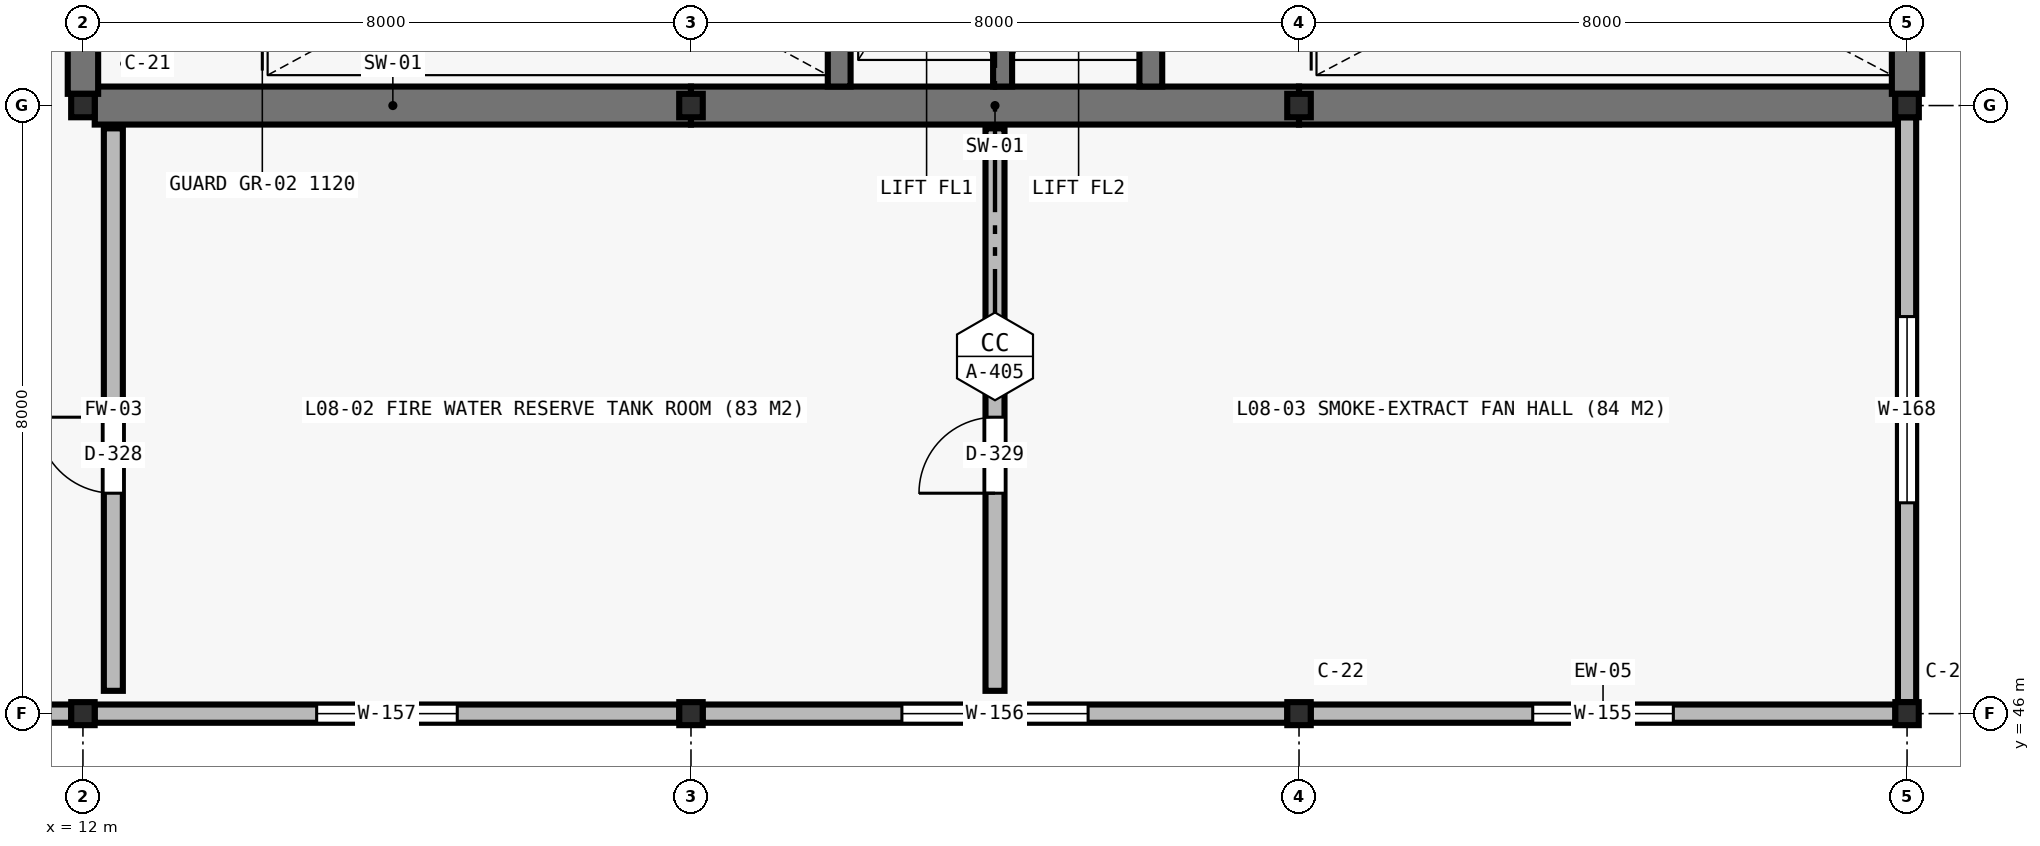
"""IFC4 building model, lengths in metres.
Left out: names, types, materials, properties, quantities, classifications, styles, units other than length and angle.
Written with IfcOpenShell. Run it as: python <this file> out.ifc"""

import sys

from ifc_helpers import new_model, si_unit, direction, frame, frame_2d, origin, origin_2d, place, context, subcontext, project, spatial, rectangle, i_section, extrude, element, fill, save


model = new_model("IFC4")
c1 = context("Model", 3, precision=1e-05, world=origin(), true_north=direction((0.0, 1.0)))
c2 = subcontext(c1, "Body", "Model", "MODEL_VIEW")
j1 = project(units=[si_unit("LENGTHUNIT", "METRE"), si_unit("PLANEANGLEUNIT", "RADIAN")], contexts=[c1])
p1 = place(None, origin())
s1 = spatial("IfcSite", under=j1, at=p1, CompositionType="ELEMENT")
p2 = place(p1, origin())
s2 = spatial("IfcBuilding", under=s1, at=p2, CompositionType="ELEMENT")
p3 = place(p2, frame((0.0, 0.0, 36.4)))
s3 = spatial("IfcBuildingStorey", under=s2, at=p3, CompositionType="ELEMENT", Elevation=36.4)
p4 = place(p3, frame((12.0, 46.0, 0.0), z_axis=(0.0, 0.0, 1.0), x_axis=(1.0, 0.0, 0.0)))
e1 = element("IfcColumn", 1, at=p4, inside=s3, PredefinedType="COLUMN", context=c2, shape_type="SweptSolid", body=[
    extrude(i_section(OverallWidth=0.308, OverallDepth=0.303, WebThickness=0.013, FlangeThickness=0.013, at=origin_2d()), origin(), (0.0, 0.0, 1.0), 3.98),
])
p5 = place(p3, frame((12.0, 54.0, 0.0), z_axis=(0.0, 0.0, 1.0), x_axis=(1.0, 0.0, 0.0)))
e2 = element("IfcColumn", 2, at=p5, inside=s3, PredefinedType="COLUMN", context=c2, shape_type="SweptSolid", body=[
    extrude(i_section(OverallWidth=0.31, OverallDepth=0.308, WebThickness=0.015, FlangeThickness=0.015, at=origin_2d()), origin(), (0.0, 0.0, 1.0), 3.98),
])
p6 = place(p3, frame((20.0, 46.0, 0.0), z_axis=(0.0, 0.0, 1.0), x_axis=(1.0, 0.0, 0.0)))
e3 = element("IfcColumn", 3, at=p6, inside=s3, PredefinedType="COLUMN", context=c2, shape_type="SweptSolid", body=[
    extrude(i_section(OverallWidth=0.308, OverallDepth=0.303, WebThickness=0.013, FlangeThickness=0.013, at=origin_2d()), origin(), (0.0, 0.0, 1.0), 3.98),
])
p7 = place(p3, frame((20.0, 54.0, 0.0), z_axis=(0.0, 0.0, 1.0), x_axis=(1.0, 0.0, 0.0)))
e4 = element("IfcColumn", 4, at=p7, inside=s3, PredefinedType="COLUMN", context=c2, shape_type="SweptSolid", body=[
    extrude(i_section(OverallWidth=0.31, OverallDepth=0.308, WebThickness=0.015, FlangeThickness=0.015, at=origin_2d()), origin(), (0.0, 0.0, 1.0), 3.98),
])
p8 = place(p3, frame((28.0, 46.0, 0.0), z_axis=(0.0, 0.0, 1.0), x_axis=(1.0, 0.0, 0.0)))
e5 = element("IfcColumn", 5, at=p8, inside=s3, PredefinedType="COLUMN", context=c2, shape_type="SweptSolid", body=[
    extrude(i_section(OverallWidth=0.308, OverallDepth=0.303, WebThickness=0.013, FlangeThickness=0.013, at=origin_2d()), origin(), (0.0, 0.0, 1.0), 3.98),
])
p9 = place(p3, frame((28.0, 54.0, 0.0), z_axis=(0.0, 0.0, 1.0), x_axis=(1.0, 0.0, 0.0)))
e6 = element("IfcColumn", 6, at=p9, inside=s3, PredefinedType="COLUMN", context=c2, shape_type="SweptSolid", body=[
    extrude(i_section(OverallWidth=0.31, OverallDepth=0.308, WebThickness=0.015, FlangeThickness=0.015, at=origin_2d()), origin(), (0.0, 0.0, 1.0), 3.98),
])
p10 = place(p3, frame((36.0, 46.0, 0.0), z_axis=(0.0, 0.0, 1.0), x_axis=(1.0, 0.0, 0.0)))
e7 = element("IfcColumn", 7, at=p10, inside=s3, PredefinedType="COLUMN", context=c2, shape_type="SweptSolid", body=[
    extrude(i_section(OverallWidth=0.308, OverallDepth=0.303, WebThickness=0.013, FlangeThickness=0.013, at=origin_2d()), origin(), (0.0, 0.0, 1.0), 3.98),
])
p11 = place(p3, frame((36.0, 54.0, 0.0), z_axis=(0.0, 0.0, 1.0), x_axis=(1.0, 0.0, 0.0)))
e8 = element("IfcColumn", 8, at=p11, inside=s3, PredefinedType="COLUMN", context=c2, shape_type="SweptSolid", body=[
    extrude(i_section(OverallWidth=0.31, OverallDepth=0.308, WebThickness=0.015, FlangeThickness=0.015, at=origin_2d()), origin(), (0.0, 0.0, 1.0), 3.98),
])
p12 = place(p3, frame((12.155, 54.0, 0.0), z_axis=(0.0, 0.0, 1.0), x_axis=(1.0, 0.0, 0.0)))
e9 = element("IfcWall", 9, at=p12, inside=s3, PredefinedType="SHEAR", context=c2, shape_type="SweptSolid", body=[
    extrude(rectangle(XDim=7.845, YDim=0.5, at=frame_2d((3.922, 0.0))), origin(), (0.0, 0.0, 1.0), 3.98),
])
p13 = place(p3, frame((20.0, 54.0, 0.0), z_axis=(0.0, 0.0, 1.0), x_axis=(1.0, 0.0, 0.0)))
e10 = element("IfcWall", 10, at=p13, inside=s3, PredefinedType="SHEAR", context=c2, shape_type="SweptSolid", body=[
    extrude(rectangle(XDim=8.0, YDim=0.5, at=frame_2d((4.0, 0.0))), origin(), (0.0, 0.0, 1.0), 3.98),
])
p14 = place(p3, frame((28.0, 54.0, 0.0), z_axis=(0.0, 0.0, 1.0), x_axis=(1.0, 0.0, 0.0)))
e11 = element("IfcWall", 11, at=p14, inside=s3, PredefinedType="SHEAR", context=c2, shape_type="SweptSolid", body=[
    extrude(rectangle(XDim=7.845, YDim=0.5, at=frame_2d((3.922, 0.0))), origin(), (0.0, 0.0, 1.0), 3.98),
])
for number, where, z_axis, x_axis in (
    (12, (12.0, 54.154, 0.0), (0.0, 0.0, 1.0), (0.0, 1.0, 0.0)),
    (13, (36.0, 54.154, 0.0), (0.0, 0.0, 1.0), (0.0, 1.0, 0.0)),
):
    element("IfcWall", number, at=place(p3, frame(where, z_axis=z_axis, x_axis=x_axis)), inside=s3, PredefinedType="SHEAR", context=c2, shape_type="SweptSolid", body=[
        extrude(rectangle(XDim=7.692, YDim=0.4, at=frame_2d((3.846, 0.0))), origin(), (0.0, 0.0, 1.0), 3.98),
    ])
for number, where, z_axis, x_axis in (
    (14, (21.95, 54.25, 0.0), (0.0, 0.0, 1.0), (0.0, 1.0, 0.0)),
    (15, (26.05, 54.25, 0.0), (0.0, 0.0, 1.0), (0.0, 1.0, 0.0)),
):
    element("IfcWall", number, at=place(p3, frame(where, z_axis=z_axis, x_axis=x_axis)), inside=s3, PredefinedType="SHEAR", context=c2, shape_type="SweptSolid", body=[
        extrude(rectangle(XDim=4.25, YDim=0.3, at=frame_2d((2.125, 0.0))), origin(), (0.0, 0.0, 1.0), 3.98),
    ])
p15 = place(p3, frame((24.1, 54.25, 0.0), z_axis=(0.0, 0.0, 1.0), x_axis=(0.0, 1.0, 0.0)))
e16 = element("IfcWall", 16, at=p15, inside=s3, PredefinedType="SHEAR", context=c2, shape_type="SweptSolid", body=[
    extrude(rectangle(XDim=3.2, YDim=0.25, at=frame_2d((1.6, 0.0))), origin(), (0.0, 0.0, 1.0), 3.98),
])
p16 = place(p3, frame((35.846, 46.0, 0.0), z_axis=(0.0, 0.0, 1.0), x_axis=(-1.0, 0.0, 0.0)))
e17 = element("IfcWall", 17, at=p16, inside=s3, PredefinedType="STANDARD", context=c2, shape_type="SweptSolid", body=[
    extrude(rectangle(XDim=7.692, YDim=0.24, at=frame_2d((3.846, 0.0))), origin(), (0.0, 0.0, 1.0), 3.573),
])
p17 = place(p16, frame((2.921, 0.0, 0.95)))
e18 = element("IfcOpeningElement", 18, at=p17, cuts=e17, PredefinedType="OPENING", context=c2, shape_type="SweptSolid", body=[
    extrude(rectangle(XDim=1.85, YDim=1.25, at=frame_2d((0.925, 0.625))), frame((0.0, 0.13, 0.0), z_axis=(0.0, -1.0, 0.0), x_axis=(1.0, 0.0, 0.0)), (0.0, 0.0, 1.0), 0.26),
])
p18 = place(p3, frame((27.846, 46.0, 0.0), z_axis=(0.0, 0.0, 1.0), x_axis=(-1.0, 0.0, 0.0)))
e19 = element("IfcWall", 19, at=p18, inside=s3, PredefinedType="STANDARD", context=c2, shape_type="SweptSolid", body=[
    extrude(rectangle(XDim=7.692, YDim=0.24, at=frame_2d((3.846, 0.0))), origin(), (0.0, 0.0, 1.0), 3.573),
])
p19 = place(p18, frame((2.621, 0.0, 0.95)))
e20 = element("IfcOpeningElement", 20, at=p19, cuts=e19, PredefinedType="OPENING", context=c2, shape_type="SweptSolid", body=[
    extrude(rectangle(XDim=2.45, YDim=1.35, at=frame_2d((1.225, 0.675))), frame((0.0, 0.13, 0.0), z_axis=(0.0, -1.0, 0.0), x_axis=(1.0, 0.0, 0.0)), (0.0, 0.0, 1.0), 0.26),
])
p20 = place(p3, frame((19.846, 46.0, 0.0), z_axis=(0.0, 0.0, 1.0), x_axis=(-1.0, 0.0, 0.0)))
e21 = element("IfcWall", 21, at=p20, inside=s3, PredefinedType="STANDARD", context=c2, shape_type="SweptSolid", body=[
    extrude(rectangle(XDim=7.692, YDim=0.24, at=frame_2d((3.846, 0.0))), origin(), (0.0, 0.0, 1.0), 3.573),
])
p21 = place(p20, frame((2.921, 0.0, 0.95)))
e22 = element("IfcOpeningElement", 22, at=p21, cuts=e21, PredefinedType="OPENING", context=c2, shape_type="SweptSolid", body=[
    extrude(rectangle(XDim=1.85, YDim=1.25, at=frame_2d((0.925, 0.625))), frame((0.0, 0.13, 0.0), z_axis=(0.0, -1.0, 0.0), x_axis=(1.0, 0.0, 0.0)), (0.0, 0.0, 1.0), 0.26),
])
p22 = place(p3, frame((11.846, 46.0, 0.0), z_axis=(0.0, 0.0, 1.0), x_axis=(-1.0, 0.0, 0.0)))
e23 = element("IfcWall", 23, at=p22, inside=s3, PredefinedType="STANDARD", context=c2, shape_type="SweptSolid", body=[
    extrude(rectangle(XDim=7.692, YDim=0.24, at=frame_2d((3.846, 0.0))), origin(), (0.0, 0.0, 1.0), 3.573),
])
p23 = place(p22, frame((2.621, 0.0, 0.95)))
e24 = element("IfcOpeningElement", 24, at=p23, cuts=e23, PredefinedType="OPENING", context=c2, shape_type="SweptSolid", body=[
    extrude(rectangle(XDim=2.45, YDim=1.35, at=frame_2d((1.225, 0.675))), frame((0.0, 0.13, 0.0), z_axis=(0.0, -1.0, 0.0), x_axis=(1.0, 0.0, 0.0)), (0.0, 0.0, 1.0), 0.26),
])
p24 = place(p3, frame((36.0, 53.846, 0.0), z_axis=(0.0, 0.0, 1.0), x_axis=(0.0, -1.0, 0.0)))
e25 = element("IfcWall", 25, at=p24, inside=s3, PredefinedType="STANDARD", context=c2, shape_type="SweptSolid", body=[
    extrude(rectangle(XDim=7.694, YDim=0.24, at=frame_2d((3.847, 0.0))), origin(), (0.0, 0.0, 1.0), 3.573),
])
p25 = place(p24, frame((2.622, 0.0, 0.95)))
e26 = element("IfcOpeningElement", 26, at=p25, cuts=e25, PredefinedType="OPENING", context=c2, shape_type="SweptSolid", body=[
    extrude(rectangle(XDim=2.45, YDim=1.35, at=frame_2d((1.225, 0.675))), frame((0.0, 0.13, 0.0), z_axis=(0.0, -1.0, 0.0), x_axis=(1.0, 0.0, 0.0)), (0.0, 0.0, 1.0), 0.26),
])
p26 = place(p3, frame((12.4, 46.3, 0.0), z_axis=(0.0, 0.0, 1.0), x_axis=(0.0, 1.0, 0.0)))
e27 = element("IfcWall", 27, at=p26, inside=s3, PredefinedType="SOLIDWALL", context=c2, shape_type="SweptSolid", body=[
    extrude(rectangle(XDim=7.4, YDim=0.25, at=frame_2d((3.7, 0.0))), origin(), (0.0, 0.0, 1.0), 3.98),
])
p27 = place(p26, frame((2.6, 0.0, 0.0)))
e28 = element("IfcOpeningElement", 28, at=p27, cuts=e27, PredefinedType="OPENING", context=c2, shape_type="SweptSolid", body=[
    extrude(rectangle(XDim=1.0, YDim=2.15, at=frame_2d((0.5, 1.075))), frame((0.0, 0.135, 0.0), z_axis=(0.0, -1.0, 0.0), x_axis=(1.0, 0.0, 0.0)), (0.0, 0.0, 1.0), 0.27),
])
p28 = place(p3, frame((24.0, 46.3, 0.0), z_axis=(0.0, 0.0, 1.0), x_axis=(0.0, 1.0, 0.0)))
e29 = element("IfcWall", 29, at=p28, inside=s3, PredefinedType="SOLIDWALL", context=c2, shape_type="SweptSolid", body=[
    extrude(rectangle(XDim=7.4, YDim=0.25, at=frame_2d((3.7, 0.0))), origin(), (0.0, 0.0, 1.0), 3.98),
])
p29 = place(p28, frame((2.6, 0.0, 0.0)))
e30 = element("IfcOpeningElement", 30, at=p29, cuts=e29, PredefinedType="OPENING", context=c2, shape_type="SweptSolid", body=[
    extrude(rectangle(XDim=1.0, YDim=2.15, at=frame_2d((0.5, 1.075))), frame((0.0, 0.135, 0.0), z_axis=(0.0, -1.0, 0.0), x_axis=(1.0, 0.0, 0.0)), (0.0, 0.0, 1.0), 0.27),
])
p30 = place(p17, origin())
e31 = element("IfcWindow", 31, at=p30, inside=s3, PartitioningType="SINGLE_PANEL", PredefinedType="WINDOW", context=c2, shape_type="SweptSolid", body=[
    extrude(rectangle(XDim=1.85, YDim=1.25, at=frame_2d((0.925, 0.625))), frame((0.0, 0.03, 0.0), z_axis=(0.0, -1.0, 0.0), x_axis=(1.0, 0.0, 0.0)), (0.0, 0.0, 1.0), 0.06),
])
fill(e18, e31)
p31 = place(p19, origin())
e32 = element("IfcWindow", 32, at=p31, inside=s3, PartitioningType="SINGLE_PANEL", PredefinedType="WINDOW", context=c2, shape_type="SweptSolid", body=[
    extrude(rectangle(XDim=2.45, YDim=1.35, at=frame_2d((1.225, 0.675))), frame((0.0, 0.03, 0.0), z_axis=(0.0, -1.0, 0.0), x_axis=(1.0, 0.0, 0.0)), (0.0, 0.0, 1.0), 0.06),
])
fill(e20, e32)
p32 = place(p21, origin())
e33 = element("IfcWindow", 33, at=p32, inside=s3, PartitioningType="SINGLE_PANEL", PredefinedType="WINDOW", context=c2, shape_type="SweptSolid", body=[
    extrude(rectangle(XDim=1.85, YDim=1.25, at=frame_2d((0.925, 0.625))), frame((0.0, 0.03, 0.0), z_axis=(0.0, -1.0, 0.0), x_axis=(1.0, 0.0, 0.0)), (0.0, 0.0, 1.0), 0.06),
])
fill(e22, e33)
p33 = place(p25, origin())
e34 = element("IfcWindow", 34, at=p33, inside=s3, PartitioningType="SINGLE_PANEL", PredefinedType="WINDOW", context=c2, shape_type="SweptSolid", body=[
    extrude(rectangle(XDim=2.45, YDim=1.35, at=frame_2d((1.225, 0.675))), frame((0.0, 0.03, 0.0), z_axis=(0.0, -1.0, 0.0), x_axis=(1.0, 0.0, 0.0)), (0.0, 0.0, 1.0), 0.06),
])
fill(e26, e34)
p34 = place(p27, origin())
e35 = element("IfcDoor", 35, at=p34, inside=s3, OperationType="SINGLE_SWING_RIGHT", PredefinedType="DOOR", context=c2, shape_type="SweptSolid", body=[
    extrude(rectangle(XDim=1.0, YDim=2.15, at=frame_2d((0.5, 1.075))), frame((0.0, 0.025, 0.0), z_axis=(0.0, -1.0, 0.0), x_axis=(1.0, 0.0, 0.0)), (0.0, 0.0, 1.0), 0.05),
])
fill(e28, e35)
p35 = place(p29, origin())
e36 = element("IfcDoor", 36, at=p35, inside=s3, OperationType="SINGLE_SWING_LEFT", PredefinedType="DOOR", context=c2, shape_type="SweptSolid", body=[
    extrude(rectangle(XDim=1.0, YDim=2.15, at=frame_2d((0.5, 1.075))), frame((0.0, 0.025, 0.0), z_axis=(0.0, -1.0, 0.0), x_axis=(1.0, 0.0, 0.0)), (0.0, 0.0, 1.0), 0.05),
])
fill(e30, e36)
save(model, sys.argv[1])
